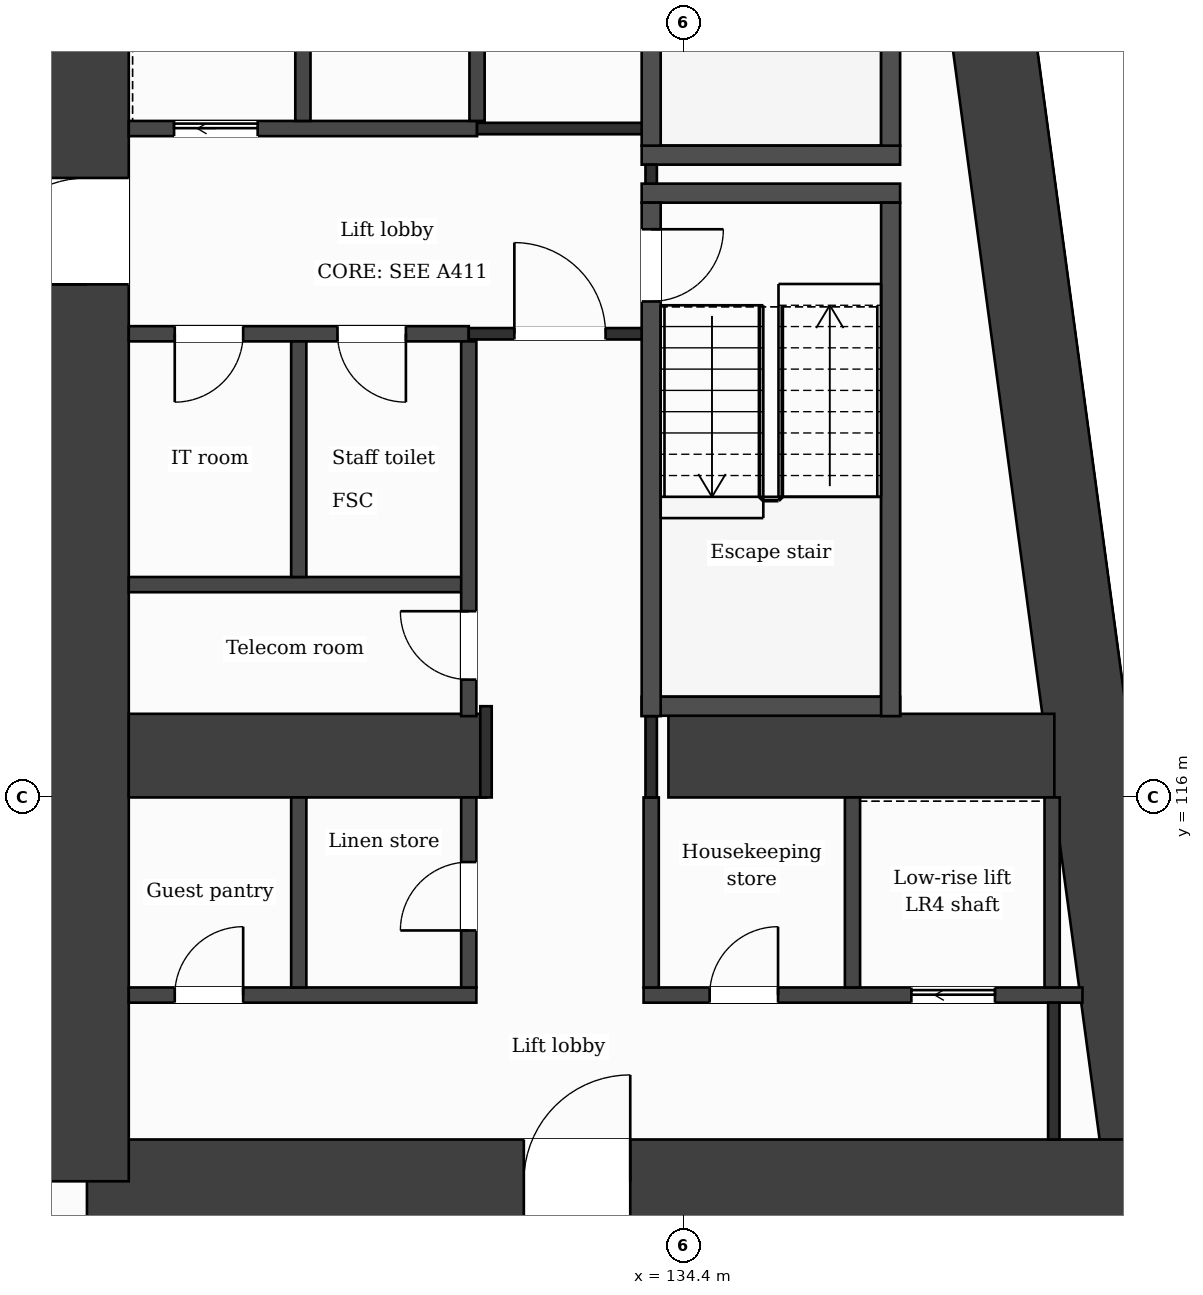
"""IFC4 building model, lengths in metres.
Left out: names, types, materials, properties, quantities, classifications, styles, units other than length and angle.
Written with IfcOpenShell. Run it as: python <this file> out.ifc"""

import sys

from ifc_helpers import new_model, si_unit, direction, frame, frame_2d, origin, place, context, subcontext, project, spatial, rectangle, extrude, element, fill, save


model = new_model("IFC4")
c1 = context("Model", 3, precision=1e-05, world=origin(), true_north=direction((0.0, 1.0)))
c2 = subcontext(c1, "Body", "Model", "MODEL_VIEW")
j1 = project(units=[si_unit("LENGTHUNIT", "METRE"), si_unit("PLANEANGLEUNIT", "RADIAN")], contexts=[c1])
p1 = place(None, origin())
s1 = spatial("IfcSite", under=j1, at=p1, CompositionType="ELEMENT")
p2 = place(p1, origin())
s2 = spatial("IfcBuilding", under=s1, at=p2, CompositionType="ELEMENT")
p3 = place(p2, frame((0.0, 0.0, 53.0)))
s3 = spatial("IfcBuildingStorey", under=s2, at=p3, CompositionType="ELEMENT", Elevation=53.0)
p4 = place(p3, frame((137.688, 131.85, 0.0), z_axis=(0.0, 0.0, 1.0), x_axis=(0.133411793472, -0.991060691059, 0.0)))
e1 = element("IfcWall", 1, at=p4, inside=s3, PredefinedType="SHEAR", context=c2, shape_type="SweptSolid", body=[
    extrude(rectangle(XDim=21.089, YDim=1.1, at=frame_2d((10.544, 0.0))), origin(), (0.0, 0.0, 1.0), 3.5),
])
p5 = place(p3, frame((140.502, 110.95, 0.0), z_axis=(0.0, 0.0, 1.0), x_axis=(-1.0, 0.0, 0.0)))
e2 = element("IfcWall", 2, at=p5, inside=s3, PredefinedType="SHEAR", context=c2, shape_type="SweptSolid", body=[
    extrude(rectangle(XDim=13.952, YDim=1.1, at=frame_2d((6.976, 0.0))), origin(), (0.0, 0.0, 1.0), 3.5),
])
p6 = place(p5, frame((6.804, 0.0, 0.0)))
e3 = element("IfcOpeningElement", 3, at=p6, cuts=e2, PredefinedType="OPENING", context=c2, shape_type="SweptSolid", body=[
    extrude(rectangle(XDim=1.4, YDim=2.1, at=frame_2d((0.7, 1.05))), frame((0.0, 0.56, 0.0), z_axis=(0.0, -1.0, 0.0), x_axis=(1.0, 0.0, 0.0)), (0.0, 0.0, 1.0), 1.12),
])
p7 = place(p3, frame((126.55, 110.95, 0.0), z_axis=(0.0, 0.0, 1.0), x_axis=(0.0, 1.0, 0.0)))
e4 = element("IfcWall", 4, at=p7, inside=s3, PredefinedType="SHEAR", context=c2, shape_type="SweptSolid", body=[
    extrude(rectangle(XDim=20.9, YDim=1.1, at=frame_2d((10.45, 0.0))), origin(), (0.0, 0.0, 1.0), 3.5),
])
p8 = place(p7, frame((11.8, 0.0, 0.0)))
e5 = element("IfcOpeningElement", 5, at=p8, cuts=e4, PredefinedType="OPENING", context=c2, shape_type="SweptSolid", body=[
    extrude(rectangle(XDim=1.4, YDim=2.1, at=frame_2d((0.7, 1.05))), frame((0.0, 0.56, 0.0), z_axis=(0.0, -1.0, 0.0), x_axis=(1.0, 0.0, 0.0)), (0.0, 0.0, 1.0), 1.12),
])
p9 = place(p3, frame((127.1, 116.55, 0.0), z_axis=(0.0, 0.0, 1.0), x_axis=(1.0, 0.0, 0.0)))
e6 = element("IfcWall", 6, at=p9, inside=s3, PredefinedType="SHEAR", context=c2, shape_type="SweptSolid", body=[
    extrude(rectangle(XDim=4.7, YDim=1.1, at=frame_2d((2.35, 0.0))), origin(), (0.0, 0.0, 1.0), 3.5),
])
p10 = place(p3, frame((134.2, 116.55, 0.0), z_axis=(0.0, 0.0, 1.0), x_axis=(1.0, 0.0, 0.0)))
e7 = element("IfcWall", 7, at=p10, inside=s3, PredefinedType="SHEAR", context=c2, shape_type="SweptSolid", body=[
    extrude(rectangle(XDim=5.077, YDim=1.1, at=frame_2d((2.539, 0.0))), origin(), (0.0, 0.0, 1.0), 3.5),
])
p11 = place(p3, frame((127.1, 113.4, 0.0), z_axis=(0.0, 0.0, 1.0), x_axis=(1.0, 0.0, 0.0)))
e8 = element("IfcWall", 8, at=p11, inside=s3, PredefinedType="PARTITIONING", context=c2, shape_type="SweptSolid", body=[
    extrude(rectangle(XDim=4.573, YDim=0.2, at=frame_2d((2.287, 0.0))), origin(), (0.0, 0.0, 1.0), 3.18),
])
p12 = place(p11, frame((0.605, 0.0, 0.0)))
e9 = element("IfcOpeningElement", 9, at=p12, cuts=e8, PredefinedType="OPENING", context=c2, shape_type="SweptSolid", body=[
    extrude(rectangle(XDim=0.9, YDim=2.1, at=frame_2d((0.45, 1.05))), frame((0.0, 0.11, 0.0), z_axis=(0.0, -1.0, 0.0), x_axis=(1.0, 0.0, 0.0)), (0.0, 0.0, 1.0), 0.22),
])
p13 = place(p3, frame((133.873, 113.4, 0.0), z_axis=(0.0, 0.0, 1.0), x_axis=(1.0, 0.0, 0.0)))
e10 = element("IfcWall", 10, at=p13, inside=s3, PredefinedType="PARTITIONING", context=c2, shape_type="SweptSolid", body=[
    extrude(rectangle(XDim=5.774, YDim=0.2, at=frame_2d((2.887, 0.0))), origin(), (0.0, 0.0, 1.0), 3.18),
])
p14 = place(p13, frame((3.523, 0.0, 0.0)))
e11 = element("IfcOpeningElement", 11, at=p14, cuts=e10, PredefinedType="OPENING", context=c2, shape_type="SweptSolid", body=[
    extrude(rectangle(XDim=1.1, YDim=2.1, at=frame_2d((0.55, 1.05))), frame((0.0, 0.11, 0.0), z_axis=(0.0, -1.0, 0.0), x_axis=(1.0, 0.0, 0.0)), (0.0, 0.0, 1.0), 0.22),
])
p15 = place(p13, frame((0.869, 0.0, 0.0)))
e12 = element("IfcOpeningElement", 12, at=p15, cuts=e10, PredefinedType="OPENING", context=c2, shape_type="SweptSolid", body=[
    extrude(rectangle(XDim=0.9, YDim=2.1, at=frame_2d((0.45, 1.05))), frame((0.0, 0.11, 0.0), z_axis=(0.0, -1.0, 0.0), x_axis=(1.0, 0.0, 0.0)), (0.0, 0.0, 1.0), 0.22),
])
p16 = place(p3, frame((133.848, 117.2, 0.0), z_axis=(0.0, 0.0, 1.0), x_axis=(1.0, 0.0, 0.0)))
e13 = element("IfcWall", 13, at=p16, inside=s3, PredefinedType="PARTITIONING", context=c2, shape_type="SweptSolid", body=[
    extrude(rectangle(XDim=3.4, YDim=0.25, at=frame_2d((1.7, 0.0))), origin(), (0.0, 0.0, 1.0), 3.18),
])
p17 = place(p3, frame((127.1, 118.8, 0.0), z_axis=(0.0, 0.0, 1.0), x_axis=(1.0, 0.0, 0.0)))
e14 = element("IfcWall", 14, at=p17, inside=s3, PredefinedType="PARTITIONING", context=c2, shape_type="SweptSolid", body=[
    extrude(rectangle(XDim=4.473, YDim=0.2, at=frame_2d((2.236, 0.0))), origin(), (0.0, 0.0, 1.0), 3.18),
])
p18 = place(p3, frame((127.1, 122.1, 0.0), z_axis=(0.0, 0.0, 1.0), x_axis=(1.0, 0.0, 0.0)))
e15 = element("IfcWall", 15, at=p18, inside=s3, PredefinedType="PARTITIONING", context=c2, shape_type="SweptSolid", body=[
    extrude(rectangle(XDim=4.473, YDim=0.2, at=frame_2d((2.236, 0.0))), origin(), (0.0, 0.0, 1.0), 3.18),
])
p19 = place(p18, frame((2.746, 0.0, 0.0)))
e16 = element("IfcOpeningElement", 16, at=p19, cuts=e15, PredefinedType="OPENING", context=c2, shape_type="SweptSolid", body=[
    extrude(rectangle(XDim=0.9, YDim=2.1, at=frame_2d((0.45, 1.05))), frame((0.0, 0.11, 0.0), z_axis=(0.0, -1.0, 0.0), x_axis=(1.0, 0.0, 0.0)), (0.0, 0.0, 1.0), 0.22),
])
p20 = place(p18, frame((0.605, 0.0, 0.0)))
e17 = element("IfcOpeningElement", 17, at=p20, cuts=e15, PredefinedType="OPENING", context=c2, shape_type="SweptSolid", body=[
    extrude(rectangle(XDim=0.9, YDim=2.1, at=frame_2d((0.45, 1.05))), frame((0.0, 0.11, 0.0), z_axis=(0.0, -1.0, 0.0), x_axis=(1.0, 0.0, 0.0)), (0.0, 0.0, 1.0), 0.22),
])
p21 = place(p3, frame((131.573, 122.1, 0.0), z_axis=(0.0, 0.0, 1.0), x_axis=(1.0, 0.0, 0.0)))
e18 = element("IfcWall", 18, at=p21, inside=s3, PredefinedType="PARTITIONING", context=c2, shape_type="SweptSolid", body=[
    extrude(rectangle(XDim=2.4, YDim=0.15, at=frame_2d((1.2, 0.0))), origin(), (0.0, 0.0, 1.0), 3.18),
])
p22 = place(p21, frame((0.6, 0.0, 0.0)))
e19 = element("IfcOpeningElement", 19, at=p22, cuts=e18, PredefinedType="OPENING", context=c2, shape_type="SweptSolid", body=[
    extrude(rectangle(XDim=1.2, YDim=2.1, at=frame_2d((0.6, 1.05))), frame((0.0, 0.085, 0.0), z_axis=(0.0, -1.0, 0.0), x_axis=(1.0, 0.0, 0.0)), (0.0, 0.0, 1.0), 0.17),
])
for number, where, z_axis, x_axis in (
    (20, (133.848, 123.95, 0.0), (0.0, 0.0, 1.0), (1.0, 0.0, 0.0)),
    (21, (133.848, 124.45, 0.0), (0.0, 0.0, 1.0), (1.0, 0.0, 0.0)),
):
    element("IfcWall", number, at=place(p3, frame(where, z_axis=z_axis, x_axis=x_axis)), inside=s3, PredefinedType="PARTITIONING", context=c2, shape_type="SweptSolid", body=[
        extrude(rectangle(XDim=3.4, YDim=0.25, at=frame_2d((1.7, 0.0))), origin(), (0.0, 0.0, 1.0), 3.18),
    ])
p23 = place(p3, frame((127.1, 124.8, 0.0), z_axis=(0.0, 0.0, 1.0), x_axis=(1.0, 0.0, 0.0)))
e22 = element("IfcWall", 22, at=p23, inside=s3, PredefinedType="PARTITIONING", context=c2, shape_type="SweptSolid", body=[
    extrude(rectangle(XDim=4.582, YDim=0.2, at=frame_2d((2.291, 0.0))), origin(), (0.0, 0.0, 1.0), 3.18),
])
p24 = place(p23, frame((0.596, 0.0, 0.0)))
e23 = element("IfcOpeningElement", 23, at=p24, cuts=e22, PredefinedType="OPENING", context=c2, shape_type="SweptSolid", body=[
    extrude(rectangle(XDim=1.1, YDim=2.1, at=frame_2d((0.55, 1.05))), frame((0.0, 0.11, 0.0), z_axis=(0.0, -1.0, 0.0), x_axis=(1.0, 0.0, 0.0)), (0.0, 0.0, 1.0), 0.22),
])
p25 = place(p3, frame((131.682, 124.8, 0.0), z_axis=(0.0, 0.0, 1.0), x_axis=(1.0, 0.0, 0.0)))
e24 = element("IfcWall", 24, at=p25, inside=s3, PredefinedType="PARTITIONING", context=c2, shape_type="SweptSolid", body=[
    extrude(rectangle(XDim=2.416, YDim=0.15, at=frame_2d((1.208, 0.0))), origin(), (0.0, 0.0, 1.0), 3.18),
])
p26 = place(p3, frame((129.336, 113.5, 0.0), z_axis=(0.0, 0.0, 1.0), x_axis=(0.0, 1.0, 0.0)))
e25 = element("IfcWall", 25, at=p26, inside=s3, PredefinedType="PARTITIONING", context=c2, shape_type="SweptSolid", body=[
    extrude(rectangle(XDim=2.5, YDim=0.2, at=frame_2d((1.25, 0.0))), origin(), (0.0, 0.0, 1.0), 3.18),
])
for number, where, z_axis, x_axis in (
    (26, (129.336, 118.9, 0.0), (0.0, 0.0, 1.0), (0.0, 1.0, 0.0)),
    (27, (129.391, 124.9, 0.0), (0.0, 0.0, 1.0), (0.0, 1.0, 0.0)),
):
    element("IfcWall", number, at=place(p3, frame(where, z_axis=z_axis, x_axis=x_axis)), inside=s3, PredefinedType="PARTITIONING", context=c2, shape_type="SweptSolid", body=[
        extrude(rectangle(XDim=3.1, YDim=0.2, at=frame_2d((1.55, 0.0))), origin(), (0.0, 0.0, 1.0), 3.18),
    ])
p27 = place(p3, frame((131.573, 113.5, 0.0), z_axis=(0.0, 0.0, 1.0), x_axis=(0.0, 1.0, 0.0)))
e28 = element("IfcWall", 28, at=p27, inside=s3, PredefinedType="PARTITIONING", context=c2, shape_type="SweptSolid", body=[
    extrude(rectangle(XDim=2.5, YDim=0.2, at=frame_2d((1.25, 0.0))), origin(), (0.0, 0.0, 1.0), 3.18),
])
p28 = place(p27, frame((0.75, 0.0, 0.0)))
e29 = element("IfcOpeningElement", 29, at=p28, cuts=e28, PredefinedType="OPENING", context=c2, shape_type="SweptSolid", body=[
    extrude(rectangle(XDim=0.9, YDim=2.1, at=frame_2d((0.45, 1.05))), frame((0.0, 0.11, 0.0), z_axis=(0.0, -1.0, 0.0), x_axis=(1.0, 0.0, 0.0)), (0.0, 0.0, 1.0), 0.22),
])
p29 = place(p3, frame((131.573, 117.07, 0.0), z_axis=(0.0, 0.0, 1.0), x_axis=(0.0, 1.0, 0.0)))
e30 = element("IfcWall", 30, at=p29, inside=s3, PredefinedType="PARTITIONING", context=c2, shape_type="SweptSolid", body=[
    extrude(rectangle(XDim=4.93, YDim=0.2, at=frame_2d((2.465, 0.0))), origin(), (0.0, 0.0, 1.0), 3.18),
])
p30 = place(p29, frame((0.48, 0.0, 0.0)))
e31 = element("IfcOpeningElement", 31, at=p30, cuts=e30, PredefinedType="OPENING", context=c2, shape_type="SweptSolid", body=[
    extrude(rectangle(XDim=0.9, YDim=2.1, at=frame_2d((0.45, 1.05))), frame((0.0, 0.11, 0.0), z_axis=(0.0, -1.0, 0.0), x_axis=(1.0, 0.0, 0.0)), (0.0, 0.0, 1.0), 0.22),
])
p31 = place(p3, frame((131.682, 124.9, 0.0), z_axis=(0.0, 0.0, 1.0), x_axis=(0.0, 1.0, 0.0)))
e32 = element("IfcWall", 32, at=p31, inside=s3, PredefinedType="PARTITIONING", context=c2, shape_type="SweptSolid", body=[
    extrude(rectangle(XDim=3.1, YDim=0.2, at=frame_2d((1.55, 0.0))), origin(), (0.0, 0.0, 1.0), 3.18),
])
p32 = place(p3, frame((131.8, 116.0, 0.0), z_axis=(0.0, 0.0, 1.0), x_axis=(0.0, 1.0, 0.0)))
e33 = element("IfcWall", 33, at=p32, inside=s3, PredefinedType="PARTITIONING", context=c2, shape_type="SweptSolid", body=[
    extrude(rectangle(XDim=1.2, YDim=0.15, at=frame_2d((0.6, 0.0))), origin(), (0.0, 0.0, 1.0), 3.18),
])
p33 = place(p3, frame((133.973, 113.5, 0.0), z_axis=(0.0, 0.0, 1.0), x_axis=(0.0, 1.0, 0.0)))
e34 = element("IfcWall", 34, at=p33, inside=s3, PredefinedType="PARTITIONING", context=c2, shape_type="SweptSolid", body=[
    extrude(rectangle(XDim=2.5, YDim=0.2, at=frame_2d((1.25, 0.0))), origin(), (0.0, 0.0, 1.0), 3.18),
])
p34 = place(p3, frame((133.973, 116.0, 0.0), z_axis=(0.0, 0.0, 1.0), x_axis=(0.0, 1.0, 0.0)))
e35 = element("IfcWall", 35, at=p34, inside=s3, PredefinedType="PARTITIONING", context=c2, shape_type="SweptSolid", body=[
    extrude(rectangle(XDim=1.07, YDim=0.15, at=frame_2d((0.535, 0.0))), origin(), (0.0, 0.0, 1.0), 3.18),
])
p35 = place(p3, frame((133.973, 124.075, 0.0), z_axis=(0.0, 0.0, 1.0), x_axis=(0.0, 1.0, 0.0)))
e36 = element("IfcWall", 36, at=p35, inside=s3, PredefinedType="PARTITIONING", context=c2, shape_type="SweptSolid", body=[
    extrude(rectangle(XDim=0.25, YDim=0.15, at=frame_2d((0.125, 0.0))), origin(), (0.0, 0.0, 1.0), 3.18),
])
p36 = place(p3, frame((133.973, 117.07, 0.0), z_axis=(0.0, 0.0, 1.0), x_axis=(0.0, 1.0, 0.0)))
e37 = element("IfcWall", 37, at=p36, inside=s3, PredefinedType="PARTITIONING", context=c2, shape_type="SweptSolid", body=[
    extrude(rectangle(XDim=6.755, YDim=0.25, at=frame_2d((3.377, 0.0))), origin(), (0.0, 0.0, 1.0), 3.18),
])
p37 = place(p36, frame((5.455, 0.0, 0.0)))
e38 = element("IfcOpeningElement", 38, at=p37, cuts=e37, PredefinedType="OPENING", context=c2, shape_type="SweptSolid", body=[
    extrude(rectangle(XDim=0.95, YDim=2.1, at=frame_2d((0.475, 1.05))), frame((0.0, 0.135, 0.0), z_axis=(0.0, -1.0, 0.0), x_axis=(1.0, 0.0, 0.0)), (0.0, 0.0, 1.0), 0.27),
])
p38 = place(p3, frame((133.973, 124.575, 0.0), z_axis=(0.0, 0.0, 1.0), x_axis=(0.0, 1.0, 0.0)))
e39 = element("IfcWall", 39, at=p38, inside=s3, PredefinedType="PARTITIONING", context=c2, shape_type="SweptSolid", body=[
    extrude(rectangle(XDim=6.755, YDim=0.25, at=frame_2d((3.377, 0.0))), origin(), (0.0, 0.0, 1.0), 3.18),
])
p39 = place(p38, frame((5.325, 0.0, 0.0)))
e40 = element("IfcOpeningElement", 40, at=p39, cuts=e39, PredefinedType="OPENING", context=c2, shape_type="SweptSolid", body=[
    extrude(rectangle(XDim=1.0, YDim=2.1, at=frame_2d((0.5, 1.05))), frame((0.0, 0.135, 0.0), z_axis=(0.0, -1.0, 0.0), x_axis=(1.0, 0.0, 0.0)), (0.0, 0.0, 1.0), 0.27),
])
p40 = place(p3, frame((136.622, 113.5, 0.0), z_axis=(0.0, 0.0, 1.0), x_axis=(0.0, 1.0, 0.0)))
e41 = element("IfcWall", 41, at=p40, inside=s3, PredefinedType="PARTITIONING", context=c2, shape_type="SweptSolid", body=[
    extrude(rectangle(XDim=2.5, YDim=0.2, at=frame_2d((1.25, 0.0))), origin(), (0.0, 0.0, 1.0), 3.18),
])
p41 = place(p3, frame((137.123, 117.07, 0.0), z_axis=(0.0, 0.0, 1.0), x_axis=(0.0, 1.0, 0.0)))
e42 = element("IfcWall", 42, at=p41, inside=s3, PredefinedType="PARTITIONING", context=c2, shape_type="SweptSolid", body=[
    extrude(rectangle(XDim=6.755, YDim=0.25, at=frame_2d((3.377, 0.0))), origin(), (0.0, 0.0, 1.0), 3.18),
])
p42 = place(p3, frame((137.123, 124.575, 0.0), z_axis=(0.0, 0.0, 1.0), x_axis=(0.0, 1.0, 0.0)))
e43 = element("IfcWall", 43, at=p42, inside=s3, PredefinedType="PARTITIONING", context=c2, shape_type="SweptSolid", body=[
    extrude(rectangle(XDim=6.5, YDim=0.25, at=frame_2d((3.25, 0.0))), origin(), (0.0, 0.0, 1.0), 3.18),
])
p43 = place(p3, frame((139.248, 113.5, 0.0), z_axis=(0.0, 0.0, 1.0), x_axis=(0.0, 1.0, 0.0)))
e44 = element("IfcWall", 44, at=p43, inside=s3, PredefinedType="PARTITIONING", context=c2, shape_type="SweptSolid", body=[
    extrude(rectangle(XDim=2.5, YDim=0.2, at=frame_2d((1.25, 0.0))), origin(), (0.0, 0.0, 1.0), 3.18),
])
p44 = place(p3, frame((139.27, 111.5, 0.0), z_axis=(0.0, 0.0, 1.0), x_axis=(0.0, 1.0, 0.0)))
e45 = element("IfcWall", 45, at=p44, inside=s3, PredefinedType="PARTITIONING", context=c2, shape_type="SweptSolid", body=[
    extrude(rectangle(XDim=1.8, YDim=0.15, at=frame_2d((0.9, 0.0))), origin(), (0.0, 0.0, 1.0), 3.18),
])
p45 = place(p22, origin())
e46 = element("IfcDoor", 46, at=p45, inside=s3, OperationType="SINGLE_SWING_LEFT", PredefinedType="DOOR", context=c2, shape_type="SweptSolid", body=[
    extrude(rectangle(XDim=1.2, YDim=2.1, at=frame_2d((0.6, 1.05))), frame((0.0, 0.025, 0.0), z_axis=(0.0, -1.0, 0.0), x_axis=(1.0, 0.0, 0.0)), (0.0, 0.0, 1.0), 0.05),
])
fill(e19, e46)
p46 = place(p24, origin())
e47 = element("IfcDoor", 47, at=p46, inside=s3, OperationType="SLIDING_TO_LEFT", PredefinedType="DOOR", context=c2, shape_type="SweptSolid", body=[
    extrude(rectangle(XDim=1.1, YDim=2.1, at=frame_2d((0.55, 1.05))), frame((0.0, 0.025, 0.0), z_axis=(0.0, -1.0, 0.0), x_axis=(1.0, 0.0, 0.0)), (0.0, 0.0, 1.0), 0.05),
])
fill(e23, e47)
p47 = place(p19, origin())
e48 = element("IfcDoor", 48, at=p47, inside=s3, OperationType="SINGLE_SWING_RIGHT", PredefinedType="DOOR", context=c2, shape_type="SweptSolid", body=[
    extrude(rectangle(XDim=0.9, YDim=2.1, at=frame_2d((0.45, 1.05))), frame((0.0, 0.025, 0.0), z_axis=(0.0, -1.0, 0.0), x_axis=(1.0, 0.0, 0.0)), (0.0, 0.0, 1.0), 0.05),
])
fill(e16, e48)
p48 = place(p20, origin())
e49 = element("IfcDoor", 49, at=p48, inside=s3, OperationType="SINGLE_SWING_LEFT", PredefinedType="DOOR", context=c2, shape_type="SweptSolid", body=[
    extrude(rectangle(XDim=0.9, YDim=2.1, at=frame_2d((0.45, 1.05))), frame((0.0, 0.025, 0.0), z_axis=(0.0, -1.0, 0.0), x_axis=(1.0, 0.0, 0.0)), (0.0, 0.0, 1.0), 0.05),
])
fill(e17, e49)
p49 = place(p37, origin())
e50 = element("IfcDoor", 50, at=p49, inside=s3, OperationType="SINGLE_SWING_RIGHT", PredefinedType="DOOR", context=c2, shape_type="SweptSolid", body=[
    extrude(rectangle(XDim=0.95, YDim=2.1, at=frame_2d((0.475, 1.05))), frame((0.0, 0.025, 0.0), z_axis=(0.0, -1.0, 0.0), x_axis=(1.0, 0.0, 0.0)), (0.0, 0.0, 1.0), 0.05),
])
fill(e38, e50)
p50 = place(p30, origin())
e51 = element("IfcDoor", 51, at=p50, inside=s3, OperationType="SINGLE_SWING_RIGHT", PredefinedType="DOOR", context=c2, shape_type="SweptSolid", body=[
    extrude(rectangle(XDim=0.9, YDim=2.1, at=frame_2d((0.45, 1.05))), frame((0.0, 0.025, 0.0), z_axis=(0.0, -1.0, 0.0), x_axis=(1.0, 0.0, 0.0)), (0.0, 0.0, 1.0), 0.05),
])
fill(e31, e51)
p51 = place(p14, origin())
e52 = element("IfcDoor", 52, at=p51, inside=s3, OperationType="SLIDING_TO_LEFT", PredefinedType="DOOR", context=c2, shape_type="SweptSolid", body=[
    extrude(rectangle(XDim=1.1, YDim=2.1, at=frame_2d((0.55, 1.05))), frame((0.0, 0.025, 0.0), z_axis=(0.0, -1.0, 0.0), x_axis=(1.0, 0.0, 0.0)), (0.0, 0.0, 1.0), 0.05),
])
fill(e11, e52)
p52 = place(p15, origin())
e53 = element("IfcDoor", 53, at=p52, inside=s3, OperationType="SINGLE_SWING_RIGHT", PredefinedType="DOOR", context=c2, shape_type="SweptSolid", body=[
    extrude(rectangle(XDim=0.9, YDim=2.1, at=frame_2d((0.45, 1.05))), frame((0.0, 0.025, 0.0), z_axis=(0.0, -1.0, 0.0), x_axis=(1.0, 0.0, 0.0)), (0.0, 0.0, 1.0), 0.05),
])
fill(e12, e53)
p53 = place(p28, origin())
e54 = element("IfcDoor", 54, at=p53, inside=s3, OperationType="SINGLE_SWING_LEFT", PredefinedType="DOOR", context=c2, shape_type="SweptSolid", body=[
    extrude(rectangle(XDim=0.9, YDim=2.1, at=frame_2d((0.45, 1.05))), frame((0.0, 0.025, 0.0), z_axis=(0.0, -1.0, 0.0), x_axis=(1.0, 0.0, 0.0)), (0.0, 0.0, 1.0), 0.05),
])
fill(e29, e54)
p54 = place(p12, origin())
e55 = element("IfcDoor", 55, at=p54, inside=s3, OperationType="SINGLE_SWING_RIGHT", PredefinedType="DOOR", context=c2, shape_type="SweptSolid", body=[
    extrude(rectangle(XDim=0.9, YDim=2.1, at=frame_2d((0.45, 1.05))), frame((0.0, 0.025, 0.0), z_axis=(0.0, -1.0, 0.0), x_axis=(1.0, 0.0, 0.0)), (0.0, 0.0, 1.0), 0.05),
])
fill(e9, e55)
p55 = place(p6, origin())
e56 = element("IfcDoor", 56, at=p55, inside=s3, OperationType="SINGLE_SWING_LEFT", PredefinedType="DOOR", context=c2, shape_type="SweptSolid", body=[
    extrude(rectangle(XDim=1.4, YDim=2.1, at=frame_2d((0.7, 1.05))), frame((0.0, 0.025, 0.0), z_axis=(0.0, -1.0, 0.0), x_axis=(1.0, 0.0, 0.0)), (0.0, 0.0, 1.0), 0.05),
])
fill(e3, e56)
p56 = place(p8, origin())
e57 = element("IfcDoor", 57, at=p56, inside=s3, OperationType="SINGLE_SWING_LEFT", PredefinedType="DOOR", context=c2, shape_type="SweptSolid", body=[
    extrude(rectangle(XDim=1.4, YDim=2.1, at=frame_2d((0.7, 1.05))), frame((0.0, 0.025, 0.0), z_axis=(0.0, -1.0, 0.0), x_axis=(1.0, 0.0, 0.0)), (0.0, 0.0, 1.0), 0.05),
])
fill(e5, e57)
save(model, sys.argv[1])
